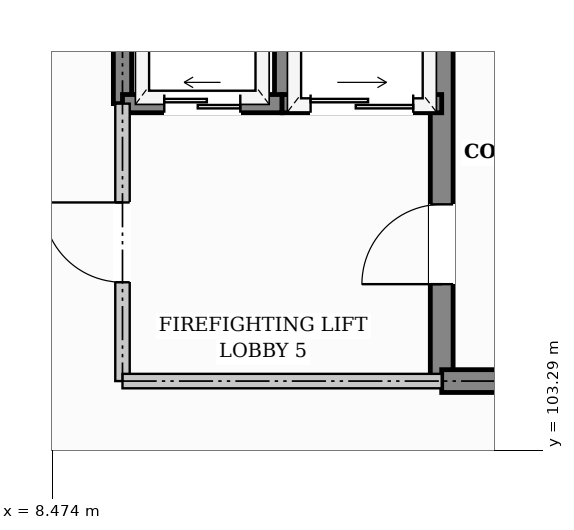
"""IFC4 building model, lengths in metres.
Left out: names, types, materials, properties, quantities, classifications, styles, units other than length and angle.
Written with IfcOpenShell. Run it as: python <this file> out.ifc"""

import sys

from ifc_helpers import new_model, si_unit, direction, frame, frame_2d, origin, place, context, subcontext, project, spatial, rectangle, extrude, element, fill, save


model = new_model("IFC4")
c1 = context("Model", 3, precision=1e-05, world=origin(), true_north=direction((0.0, 1.0)))
c2 = subcontext(c1, "Body", "Model", "MODEL_VIEW")
j1 = project(units=[si_unit("LENGTHUNIT", "METRE"), si_unit("PLANEANGLEUNIT", "RADIAN")], contexts=[c1])
p1 = place(None, origin())
s1 = spatial("IfcSite", under=j1, at=p1, CompositionType="ELEMENT")
p2 = place(p1, origin())
s2 = spatial("IfcBuilding", under=s1, at=p2, CompositionType="ELEMENT")
p3 = place(p2, frame((0.0, 0.0, 16.8)))
s3 = spatial("IfcBuildingStorey", under=s2, at=p3, CompositionType="ELEMENT", Elevation=16.8)
p4 = place(p3, frame((13.6, 104.2, 0.0), z_axis=(0.0, 0.0, 1.0), x_axis=(0.0, 1.0, 0.0)))
e1 = element("IfcWall", 1, at=p4, inside=s3, PredefinedType="SHEAR", context=c2, shape_type="SweptSolid", body=[
    extrude(rectangle(XDim=6.0, YDim=0.3, at=frame_2d((3.0, 0.0))), origin(), (0.0, 0.0, 1.0), 3.42),
])
p5 = place(p4, frame((1.275, 0.0, 0.0)))
e2 = element("IfcOpeningElement", 2, at=p5, cuts=e1, PredefinedType="OPENING", context=c2, shape_type="SweptSolid", body=[
    extrude(rectangle(XDim=1.05, YDim=2.15, at=frame_2d((0.525, 1.075))), frame((0.0, 0.16, 0.0), z_axis=(0.0, -1.0, 0.0), x_axis=(1.0, 0.0, 0.0)), (0.0, 0.0, 1.0), 0.32),
])
p6 = place(p3, frame((13.6, 104.2, 0.0), z_axis=(0.0, 0.0, 1.0), x_axis=(1.0, 0.0, 0.0)))
e3 = element("IfcWall", 3, at=p6, inside=s3, PredefinedType="SHEAR", context=c2, shape_type="SweptSolid", body=[
    extrude(rectangle(XDim=7.0, YDim=0.3, at=frame_2d((3.5, 0.0))), origin(), (0.0, 0.0, 1.0), 3.42),
])
p7 = place(p3, frame((9.4, 107.85, 0.0), z_axis=(0.0, 0.0, 1.0), x_axis=(0.0, 1.0, 0.0)))
e4 = element("IfcWall", 4, at=p7, inside=s3, PredefinedType="SHEAR", context=c2, shape_type="SweptSolid", body=[
    extrude(rectangle(XDim=2.35, YDim=0.24, at=frame_2d((1.175, 0.0))), origin(), (0.0, 0.0, 1.0), 3.42),
])
p8 = place(p3, frame((11.5, 107.85, 0.0), z_axis=(0.0, 0.0, 1.0), x_axis=(0.0, 1.0, 0.0)))
e5 = element("IfcWall", 5, at=p8, inside=s3, PredefinedType="SHEAR", context=c2, shape_type="SweptSolid", body=[
    extrude(rectangle(XDim=2.35, YDim=0.2, at=frame_2d((1.175, 0.0))), origin(), (0.0, 0.0, 1.0), 3.42),
])
p9 = place(p3, frame((9.4, 107.85, 0.0), z_axis=(0.0, 0.0, 1.0), x_axis=(1.0, 0.0, 0.0)))
e6 = element("IfcWall", 6, at=p9, inside=s3, PredefinedType="SHEAR", context=c2, shape_type="SweptSolid", body=[
    extrude(rectangle(XDim=2.1, YDim=0.24, at=frame_2d((1.05, 0.0))), origin(), (0.0, 0.0, 1.0), 3.42),
])
p10 = place(p9, frame((0.55, 0.0, 0.0)))
e7 = element("IfcOpeningElement", 7, at=p10, cuts=e6, PredefinedType="OPENING", context=c2, shape_type="SweptSolid", body=[
    extrude(rectangle(XDim=1.0, YDim=2.1, at=frame_2d((0.5, 1.05))), frame((0.0, 0.13, 0.0), z_axis=(0.0, -1.0, 0.0), x_axis=(1.0, 0.0, 0.0)), (0.0, 0.0, 1.0), 0.26),
])
p11 = place(p3, frame((11.5, 107.85, 0.0), z_axis=(0.0, 0.0, 1.0), x_axis=(1.0, 0.0, 0.0)))
e8 = element("IfcWall", 8, at=p11, inside=s3, PredefinedType="SHEAR", context=c2, shape_type="SweptSolid", body=[
    extrude(rectangle(XDim=2.1, YDim=0.24, at=frame_2d((1.05, 0.0))), origin(), (0.0, 0.0, 1.0), 3.42),
])
p12 = place(p11, frame((0.375, 0.0, 0.0)))
e9 = element("IfcOpeningElement", 9, at=p12, cuts=e8, PredefinedType="OPENING", context=c2, shape_type="SweptSolid", body=[
    extrude(rectangle(XDim=1.35, YDim=2.2, at=frame_2d((0.675, 1.1))), frame((0.0, 0.13, 0.0), z_axis=(0.0, -1.0, 0.0), x_axis=(1.0, 0.0, 0.0)), (0.0, 0.0, 1.0), 0.26),
])
p13 = place(p3, frame((9.4, 104.2, 0.0), z_axis=(0.0, 0.0, 1.0), x_axis=(0.0, 1.0, 0.0)))
e10 = element("IfcWall", 10, at=p13, inside=s3, PredefinedType="PARTITIONING", context=c2, shape_type="SweptSolid", body=[
    extrude(rectangle(XDim=3.65, YDim=0.19, at=frame_2d((1.825, 0.0))), origin(), (0.0, 0.0, 1.0), 3.42),
])
p14 = place(p13, frame((1.3, 0.0, 0.0)))
e11 = element("IfcOpeningElement", 11, at=p14, cuts=e10, PredefinedType="OPENING", context=c2, shape_type="SweptSolid", body=[
    extrude(rectangle(XDim=1.05, YDim=2.15, at=frame_2d((0.525, 1.075))), frame((0.0, 0.105, 0.0), z_axis=(0.0, -1.0, 0.0), x_axis=(1.0, 0.0, 0.0)), (0.0, 0.0, 1.0), 0.21),
])
p15 = place(p3, frame((9.4, 104.2, 0.0), z_axis=(0.0, 0.0, 1.0), x_axis=(1.0, 0.0, 0.0)))
e12 = element("IfcWall", 12, at=p15, inside=s3, PredefinedType="PARTITIONING", context=c2, shape_type="SweptSolid", body=[
    extrude(rectangle(XDim=4.2, YDim=0.19, at=frame_2d((2.1, 0.0))), origin(), (0.0, 0.0, 1.0), 3.42),
])
p16 = place(p5, origin())
e13 = element("IfcDoor", 13, at=p16, inside=s3, OperationType="SINGLE_SWING_LEFT", PredefinedType="DOOR", context=c2, shape_type="SweptSolid", body=[
    extrude(rectangle(XDim=1.05, YDim=2.15, at=frame_2d((0.525, 1.075))), frame((0.0, 0.025, 0.0), z_axis=(0.0, -1.0, 0.0), x_axis=(1.0, 0.0, 0.0)), (0.0, 0.0, 1.0), 0.05),
])
fill(e2, e13)
p17 = place(p10, origin())
e14 = element("IfcDoor", 14, at=p17, inside=s3, OperationType="SLIDING_TO_LEFT", PredefinedType="DOOR", context=c2, shape_type="SweptSolid", body=[
    extrude(rectangle(XDim=1.0, YDim=2.1, at=frame_2d((0.5, 1.05))), frame((0.0, 0.025, 0.0), z_axis=(0.0, -1.0, 0.0), x_axis=(1.0, 0.0, 0.0)), (0.0, 0.0, 1.0), 0.05),
])
fill(e7, e14)
p18 = place(p12, origin())
e15 = element("IfcDoor", 15, at=p18, inside=s3, OperationType="SLIDING_TO_RIGHT", PredefinedType="DOOR", context=c2, shape_type="SweptSolid", body=[
    extrude(rectangle(XDim=1.35, YDim=2.2, at=frame_2d((0.675, 1.1))), frame((0.0, 0.025, 0.0), z_axis=(0.0, -1.0, 0.0), x_axis=(1.0, 0.0, 0.0)), (0.0, 0.0, 1.0), 0.05),
])
fill(e9, e15)
p19 = place(p14, origin())
e16 = element("IfcDoor", 16, at=p19, inside=s3, OperationType="SINGLE_SWING_RIGHT", PredefinedType="DOOR", context=c2, shape_type="SweptSolid", body=[
    extrude(rectangle(XDim=1.05, YDim=2.15, at=frame_2d((0.525, 1.075))), frame((0.0, 0.025, 0.0), z_axis=(0.0, -1.0, 0.0), x_axis=(1.0, 0.0, 0.0)), (0.0, 0.0, 1.0), 0.05),
])
fill(e11, e16)
save(model, sys.argv[1])
